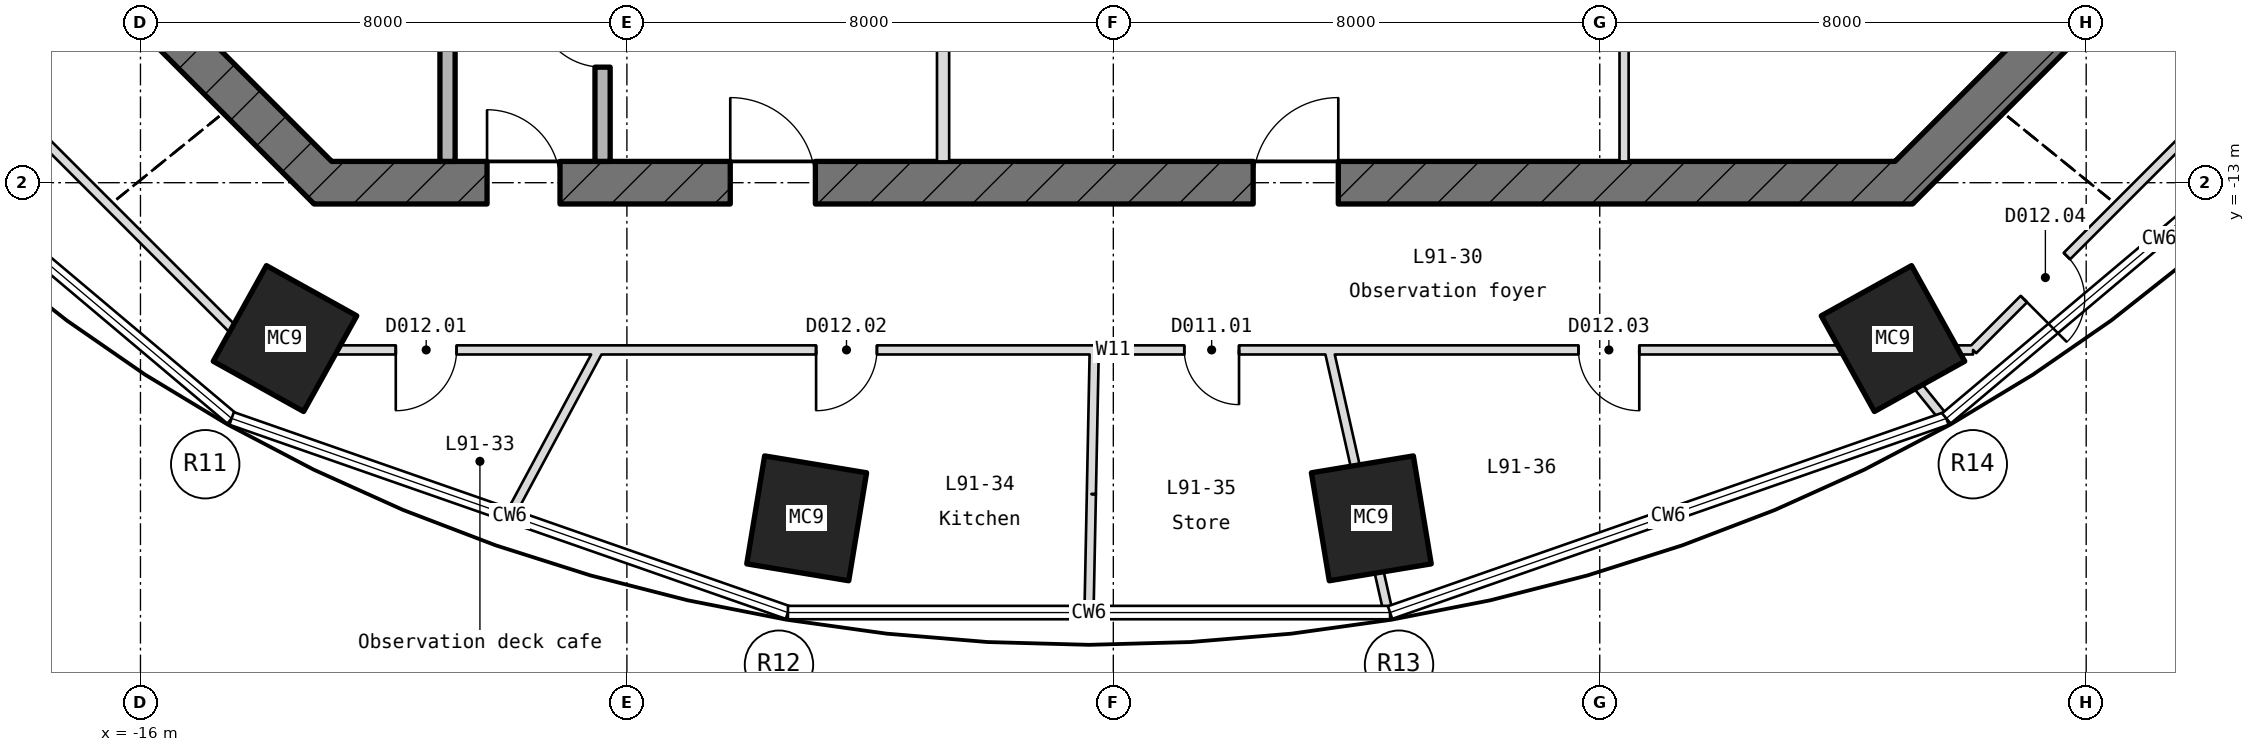
"""IFC4 building model, lengths in metres.
Left out: names, types, materials, properties, quantities, classifications, styles, units other than length and angle.
Written with IfcOpenShell. Run it as: python <this file> out.ifc"""

import sys

from ifc_helpers import new_model, si_unit, direction, frame, frame_2d, origin, origin_2d, place, context, subcontext, project, spatial, rectangle, hollow_rectangle, extrude, element, fill, save


model = new_model("IFC4")
c1 = context("Model", 3, precision=1e-05, world=origin(), true_north=direction((0.0, 1.0)))
c2 = subcontext(c1, "Body", "Model", "MODEL_VIEW")
j1 = project(units=[si_unit("LENGTHUNIT", "METRE"), si_unit("PLANEANGLEUNIT", "RADIAN")], contexts=[c1])
p1 = place(None, origin())
s1 = spatial("IfcSite", under=j1, at=p1, CompositionType="ELEMENT")
p2 = place(p1, origin())
s2 = spatial("IfcBuilding", under=s1, at=p2, CompositionType="ELEMENT")
p3 = place(p2, frame((0.0, 0.0, 401.95)))
s3 = spatial("IfcBuildingStorey", under=s2, at=p3, CompositionType="ELEMENT", Elevation=401.95)
for number, where, z_axis, x_axis in (
    (1, (-13.623, -15.563, -0.25), (0.0, 0.0, 1.0), (-0.874, 0.486, 0.0)),
    (2, (-5.043, -18.52, -0.25), (0.0, 0.0, 1.0), (-0.987, 0.163, 0.0)),
    (3, (4.243, -18.52, -0.25), (0.0, 0.0, 1.0), (-0.987, -0.163, 0.0)),
    (4, (12.823, -15.563, -0.25), (0.0, 0.0, 1.0), (-0.874, -0.486, 0.0)),
):
    element("IfcColumn", number, at=place(p3, frame(where, z_axis=z_axis, x_axis=x_axis)), inside=s3, PredefinedType="COLUMN", context=c2, shape_type="SweptSolid", body=[
        extrude(hollow_rectangle(XDim=1.7, YDim=1.8, WallThickness=0.05, at=origin_2d()), origin(), (0.0, 0.0, 1.0), 5.55),
    ])
for number, where, z_axis, x_axis in (
    (5, (12.897, -13.103, -0.25), (0.0, 0.0, 1.0), (0.707, 0.707, 0.0)),
    (6, (-16.103, -9.897, -0.25), (0.0, 0.0, 1.0), (0.707, -0.707, 0.0)),
):
    element("IfcWall", number, at=place(p3, frame(where, z_axis=z_axis, x_axis=x_axis)), inside=s3, PredefinedType="SHEAR", context=c2, shape_type="SweptSolid", body=[
        extrude(rectangle(XDim=4.533, YDim=0.7, at=frame_2d((2.266, 0.0))), origin(), (0.0, 0.0, 1.0), 5.55),
    ])
p4 = place(p3, frame((-13.145, -13.0, -0.25), z_axis=(0.0, 0.0, 1.0), x_axis=(1.0, 0.0, 0.0)))
e7 = element("IfcWall", 7, at=p4, inside=s3, PredefinedType="SHEAR", context=c2, shape_type="SweptSolid", body=[
    extrude(rectangle(XDim=26.29, YDim=0.7, at=frame_2d((13.145, 0.0))), origin(), (0.0, 0.0, 1.0), 5.55),
])
p5 = place(p4, frame((2.845, 0.0, 0.25)))
e8 = element("IfcOpeningElement", 8, at=p5, cuts=e7, PredefinedType="OPENING", context=c2, shape_type="SweptSolid", body=[
    extrude(rectangle(XDim=1.2, YDim=2.1, at=frame_2d((0.6, 1.05))), frame((0.0, 0.36, 0.0), z_axis=(0.0, -1.0, 0.0), x_axis=(1.0, 0.0, 0.0)), (0.0, 0.0, 1.0), 0.72),
])
p6 = place(p4, frame((6.845, 0.0, 0.25)))
e9 = element("IfcOpeningElement", 9, at=p6, cuts=e7, PredefinedType="OPENING", context=c2, shape_type="SweptSolid", body=[
    extrude(rectangle(XDim=1.4, YDim=2.1, at=frame_2d((0.7, 1.05))), frame((0.0, 0.36, 0.0), z_axis=(0.0, -1.0, 0.0), x_axis=(1.0, 0.0, 0.0)), (0.0, 0.0, 1.0), 0.72),
])
p7 = place(p4, frame((15.445, 0.0, 0.25)))
e10 = element("IfcOpeningElement", 10, at=p7, cuts=e7, PredefinedType="OPENING", context=c2, shape_type="SweptSolid", body=[
    extrude(rectangle(XDim=1.4, YDim=2.1, at=frame_2d((0.7, 1.05))), frame((0.0, 0.36, 0.0), z_axis=(0.0, -1.0, 0.0), x_axis=(1.0, 0.0, 0.0)), (0.0, 0.0, 1.0), 0.72),
])
p8 = place(p3, frame((-10.95, -12.65, 0.0), z_axis=(0.0, 0.0, 1.0), x_axis=(0.0, 1.0, 0.0)))
e11 = element("IfcWall", 11, at=p8, inside=s3, PredefinedType="STANDARD", context=c2, shape_type="SweptSolid", body=[
    extrude(rectangle(XDim=3.775, YDim=0.25, at=frame_2d((1.887, 0.0))), origin(), (0.0, 0.0, 1.0), 5.3),
])
p9 = place(p3, frame((-8.4, -12.65, 0.0), z_axis=(0.0, 0.0, 1.0), x_axis=(0.0, 1.0, 0.0)))
e12 = element("IfcWall", 12, at=p9, inside=s3, PredefinedType="STANDARD", context=c2, shape_type="SweptSolid", body=[
    extrude(rectangle(XDim=3.9, YDim=0.25, at=frame_2d((1.95, 0.0))), origin(), (0.0, 0.0, 1.0), 5.3),
])
p10 = place(p9, frame((1.55, 0.0, 0.0)))
e13 = element("IfcOpeningElement", 13, at=p10, cuts=e12, PredefinedType="OPENING", context=c2, shape_type="SweptSolid", body=[
    extrude(rectangle(XDim=1.1, YDim=2.1, at=frame_2d((0.55, 1.05))), frame((0.0, 0.135, 0.0), z_axis=(0.0, -1.0, 0.0), x_axis=(1.0, 0.0, 0.0)), (0.0, 0.0, 1.0), 0.27),
])
p11 = place(p3, frame((-2.8, -12.65, 0.0), z_axis=(0.0, 0.0, 1.0), x_axis=(0.0, 1.0, 0.0)))
e14 = element("IfcWall", 14, at=p11, inside=s3, PredefinedType="PARTITIONING", context=c2, shape_type="SweptSolid", body=[
    extrude(rectangle(XDim=4.19, YDim=0.2, at=frame_2d((2.095, 0.0))), origin(), (0.0, 0.0, 1.0), 5.3),
])
p12 = place(p3, frame((8.4, -12.65, 0.0), z_axis=(0.0, 0.0, 1.0), x_axis=(0.0, 1.0, 0.0)))
e15 = element("IfcWall", 15, at=p12, inside=s3, PredefinedType="PARTITIONING", context=c2, shape_type="SweptSolid", body=[
    extrude(rectangle(XDim=4.3, YDim=0.15, at=frame_2d((2.15, 0.0))), origin(), (0.0, 0.0, 1.0), 5.3),
])
p13 = place(p3, frame((-14.139, -15.75, 0.0), z_axis=(0.0, 0.0, 1.0), x_axis=(1.0, 0.0, 0.0)))
e16 = element("IfcWall", 16, at=p13, inside=s3, PredefinedType="PARTITIONING", context=c2, shape_type="SweptSolid", body=[
    extrude(rectangle(XDim=28.278, YDim=0.15, at=frame_2d((14.139, 0.0))), origin(), (0.0, 0.0, 1.0), 5.3),
])
p14 = place(p13, frame((2.338, 0.0, 0.0)))
e17 = element("IfcOpeningElement", 17, at=p14, cuts=e16, PredefinedType="OPENING", context=c2, shape_type="SweptSolid", body=[
    extrude(rectangle(XDim=1.0, YDim=2.1, at=frame_2d((0.5, 1.05))), frame((0.0, 0.085, 0.0), z_axis=(0.0, -1.0, 0.0), x_axis=(1.0, 0.0, 0.0)), (0.0, 0.0, 1.0), 0.17),
])
p15 = place(p13, frame((9.251, 0.0, 0.0)))
e18 = element("IfcOpeningElement", 18, at=p15, cuts=e16, PredefinedType="OPENING", context=c2, shape_type="SweptSolid", body=[
    extrude(rectangle(XDim=1.0, YDim=2.1, at=frame_2d((0.5, 1.05))), frame((0.0, 0.085, 0.0), z_axis=(0.0, -1.0, 0.0), x_axis=(1.0, 0.0, 0.0)), (0.0, 0.0, 1.0), 0.17),
])
p16 = place(p13, frame((15.306, 0.0, 0.0)))
e19 = element("IfcOpeningElement", 19, at=p16, cuts=e16, PredefinedType="OPENING", context=c2, shape_type="SweptSolid", body=[
    extrude(rectangle(XDim=0.9, YDim=2.1, at=frame_2d((0.45, 1.05))), frame((0.0, 0.085, 0.0), z_axis=(0.0, -1.0, 0.0), x_axis=(1.0, 0.0, 0.0)), (0.0, 0.0, 1.0), 0.17),
])
p17 = place(p13, frame((21.789, 0.0, 0.0)))
e20 = element("IfcOpeningElement", 20, at=p17, cuts=e16, PredefinedType="OPENING", context=c2, shape_type="SweptSolid", body=[
    extrude(rectangle(XDim=1.0, YDim=2.1, at=frame_2d((0.5, 1.05))), frame((0.0, 0.085, 0.0), z_axis=(0.0, -1.0, 0.0), x_axis=(1.0, 0.0, 0.0)), (0.0, 0.0, 1.0), 0.17),
])
p18 = place(p3, frame((14.139, -15.75, 0.0), z_axis=(0.0, 0.0, 1.0), x_axis=(0.707106781187, 0.707106781187, 0.0)))
e21 = element("IfcWall", 21, at=p18, inside=s3, PredefinedType="PARTITIONING", context=c2, shape_type="SweptSolid", body=[
    extrude(rectangle(XDim=6.521, YDim=0.15, at=frame_2d((3.26, 0.0))), origin(), (0.0, 0.0, 1.0), 5.3),
])
p19 = place(p18, frame((1.183, 0.0, 0.0)))
e22 = element("IfcOpeningElement", 22, at=p19, cuts=e21, PredefinedType="OPENING", context=c2, shape_type="SweptSolid", body=[
    extrude(rectangle(XDim=1.0, YDim=2.1, at=frame_2d((0.5, 1.05))), frame((0.0, 0.085, 0.0), z_axis=(0.0, -1.0, 0.0), x_axis=(1.0, 0.0, 0.0)), (0.0, 0.0, 1.0), 0.17),
])
p20 = place(p3, frame((-9.916, -18.455, 0.0), z_axis=(0.0, 0.0, 1.0), x_axis=(0.473288897356, 0.880907270738, 0.0)))
e23 = element("IfcWall", 23, at=p20, inside=s3, PredefinedType="PARTITIONING", context=c2, shape_type="SweptSolid", body=[
    extrude(rectangle(XDim=3.071, YDim=0.15, at=frame_2d((1.535, 0.0))), origin(), (0.0, 0.0, 1.0), 5.3),
])
p21 = place(p3, frame((-0.4, -20.049, 0.0), z_axis=(0.0, 0.0, 1.0), x_axis=(0.019993471392, 0.999800110573, 0.0)))
e24 = element("IfcWall", 24, at=p21, inside=s3, PredefinedType="PARTITIONING", context=c2, shape_type="SweptSolid", body=[
    extrude(rectangle(XDim=1.929, YDim=0.15, at=frame_2d((0.965, 0.0))), origin(), (0.0, 0.0, 1.0), 5.3),
])
p22 = place(p3, frame((-0.361, -18.12, 0.0), z_axis=(0.0, 0.0, 1.0), x_axis=(0.019874536925, 0.999802481884, 0.0)))
e25 = element("IfcWall", 25, at=p22, inside=s3, PredefinedType="PARTITIONING", context=c2, shape_type="SweptSolid", body=[
    extrude(rectangle(XDim=2.371, YDim=0.15, at=frame_2d((1.186, 0.0))), origin(), (0.0, 0.0, 1.0), 4.99),
])
p23 = place(p3, frame((4.517, -20.049, 0.0), z_axis=(0.0, 0.0, 1.0), x_axis=(-0.219784451293, 0.975548458545, 0.0)))
e26 = element("IfcWall", 26, at=p23, inside=s3, PredefinedType="PARTITIONING", context=c2, shape_type="SweptSolid", body=[
    extrude(rectangle(XDim=2.454, YDim=0.15, at=frame_2d((1.227, 0.0))), origin(), (0.0, 0.0, 1.0), 5.3),
])
p24 = place(p3, frame((3.978, -17.656, 0.0), z_axis=(0.0, 0.0, 1.0), x_axis=(-0.219735255916, 0.975559540627, 0.0)))
e27 = element("IfcWall", 27, at=p24, inside=s3, PredefinedType="PARTITIONING", context=c2, shape_type="SweptSolid", body=[
    extrude(rectangle(XDim=1.953, YDim=0.15, at=frame_2d((0.977, 0.0))), origin(), (0.0, 0.0, 1.0), 4.459),
])
p25 = place(p3, frame((13.659, -16.87, 0.0), z_axis=(0.0, 0.0, 1.0), x_axis=(-0.629290809625, 0.77716991509, 0.0)))
e28 = element("IfcWall", 28, at=p25, inside=s3, PredefinedType="PARTITIONING", context=c2, shape_type="SweptSolid", body=[
    extrude(rectangle(XDim=1.441, YDim=0.15, at=frame_2d((0.721, 0.0))), origin(), (0.0, 0.0, 1.0), 5.3),
])
p26 = place(p3, frame((-14.139, -15.75, 0.0), z_axis=(0.0, 0.0, 1.0), x_axis=(-0.707106781187, 0.707106781187, 0.0)))
e29 = element("IfcWall", 29, at=p26, inside=s3, PredefinedType="PARTITIONING", context=c2, shape_type="SweptSolid", body=[
    extrude(rectangle(XDim=6.521, YDim=0.15, at=frame_2d((3.26, 0.0))), origin(), (0.0, 0.0, 1.0), 5.3),
])
p27 = place(p10, origin())
e30 = element("IfcDoor", 30, at=p27, inside=s3, OperationType="SINGLE_SWING_RIGHT", PredefinedType="DOOR", context=c2, shape_type="SweptSolid", body=[
    extrude(rectangle(XDim=1.1, YDim=2.1, at=frame_2d((0.55, 1.05))), frame((0.0, 0.025, 0.0), z_axis=(0.0, -1.0, 0.0), x_axis=(1.0, 0.0, 0.0)), (0.0, 0.0, 1.0), 0.05),
])
fill(e13, e30)
p28 = place(p5, origin())
e31 = element("IfcDoor", 31, at=p28, inside=s3, OperationType="SINGLE_SWING_RIGHT", PredefinedType="DOOR", context=c2, shape_type="SweptSolid", body=[
    extrude(rectangle(XDim=1.2, YDim=2.1, at=frame_2d((0.6, 1.05))), frame((0.0, 0.025, 0.0), z_axis=(0.0, -1.0, 0.0), x_axis=(1.0, 0.0, 0.0)), (0.0, 0.0, 1.0), 0.05),
])
fill(e8, e31)
p29 = place(p6, origin())
e32 = element("IfcDoor", 32, at=p29, inside=s3, OperationType="SINGLE_SWING_RIGHT", PredefinedType="DOOR", context=c2, shape_type="SweptSolid", body=[
    extrude(rectangle(XDim=1.4, YDim=2.1, at=frame_2d((0.7, 1.05))), frame((0.0, 0.025, 0.0), z_axis=(0.0, -1.0, 0.0), x_axis=(1.0, 0.0, 0.0)), (0.0, 0.0, 1.0), 0.05),
])
fill(e9, e32)
p30 = place(p7, origin())
e33 = element("IfcDoor", 33, at=p30, inside=s3, OperationType="SINGLE_SWING_RIGHT", PredefinedType="DOOR", context=c2, shape_type="SweptSolid", body=[
    extrude(rectangle(XDim=1.4, YDim=2.1, at=frame_2d((0.7, 1.05))), frame((0.0, 0.025, 0.0), z_axis=(0.0, -1.0, 0.0), x_axis=(1.0, 0.0, 0.0)), (0.0, 0.0, 1.0), 0.05),
])
fill(e10, e33)
p31 = place(p14, frame((1.0, 0.0, 0.0), z_axis=(0.0, 0.0, 1.0), x_axis=(-1.0, 0.0, 0.0)))
e34 = element("IfcDoor", 34, at=p31, inside=s3, OperationType="SINGLE_SWING_LEFT", PredefinedType="DOOR", context=c2, shape_type="SweptSolid", body=[
    extrude(rectangle(XDim=1.0, YDim=2.1, at=frame_2d((0.5, 1.05))), frame((0.0, 0.025, 0.0), z_axis=(0.0, -1.0, 0.0), x_axis=(1.0, 0.0, 0.0)), (0.0, 0.0, 1.0), 0.05),
])
fill(e17, e34)
p32 = place(p15, frame((1.0, 0.0, 0.0), z_axis=(0.0, 0.0, 1.0), x_axis=(-1.0, 0.0, 0.0)))
e35 = element("IfcDoor", 35, at=p32, inside=s3, OperationType="SINGLE_SWING_LEFT", PredefinedType="DOOR", context=c2, shape_type="SweptSolid", body=[
    extrude(rectangle(XDim=1.0, YDim=2.1, at=frame_2d((0.5, 1.05))), frame((0.0, 0.025, 0.0), z_axis=(0.0, -1.0, 0.0), x_axis=(1.0, 0.0, 0.0)), (0.0, 0.0, 1.0), 0.05),
])
fill(e18, e35)
p33 = place(p16, frame((0.9, 0.0, 0.0), z_axis=(0.0, 0.0, 1.0), x_axis=(-1.0, 0.0, 0.0)))
e36 = element("IfcDoor", 36, at=p33, inside=s3, OperationType="SINGLE_SWING_LEFT", PredefinedType="DOOR", context=c2, shape_type="SweptSolid", body=[
    extrude(rectangle(XDim=0.9, YDim=2.1, at=frame_2d((0.45, 1.05))), frame((0.0, 0.025, 0.0), z_axis=(0.0, -1.0, 0.0), x_axis=(1.0, 0.0, 0.0)), (0.0, 0.0, 1.0), 0.05),
])
fill(e19, e36)
p34 = place(p17, frame((1.0, 0.0, 0.0), z_axis=(0.0, 0.0, 1.0), x_axis=(-1.0, 0.0, 0.0)))
e37 = element("IfcDoor", 37, at=p34, inside=s3, OperationType="SINGLE_SWING_LEFT", PredefinedType="DOOR", context=c2, shape_type="SweptSolid", body=[
    extrude(rectangle(XDim=1.0, YDim=2.1, at=frame_2d((0.5, 1.05))), frame((0.0, 0.025, 0.0), z_axis=(0.0, -1.0, 0.0), x_axis=(1.0, 0.0, 0.0)), (0.0, 0.0, 1.0), 0.05),
])
fill(e20, e37)
p35 = place(p19, frame((1.0, 0.0, 0.0), z_axis=(0.0, 0.0, 1.0), x_axis=(-1.0, 0.0, 0.0)))
e38 = element("IfcDoor", 38, at=p35, inside=s3, OperationType="SINGLE_SWING_LEFT", PredefinedType="DOOR", context=c2, shape_type="SweptSolid", body=[
    extrude(rectangle(XDim=1.0, YDim=2.1, at=frame_2d((0.5, 1.05))), frame((0.0, 0.025, 0.0), z_axis=(0.0, -1.0, 0.0), x_axis=(1.0, 0.0, 0.0)), (0.0, 0.0, 1.0), 0.05),
])
fill(e22, e38)
save(model, sys.argv[1])
